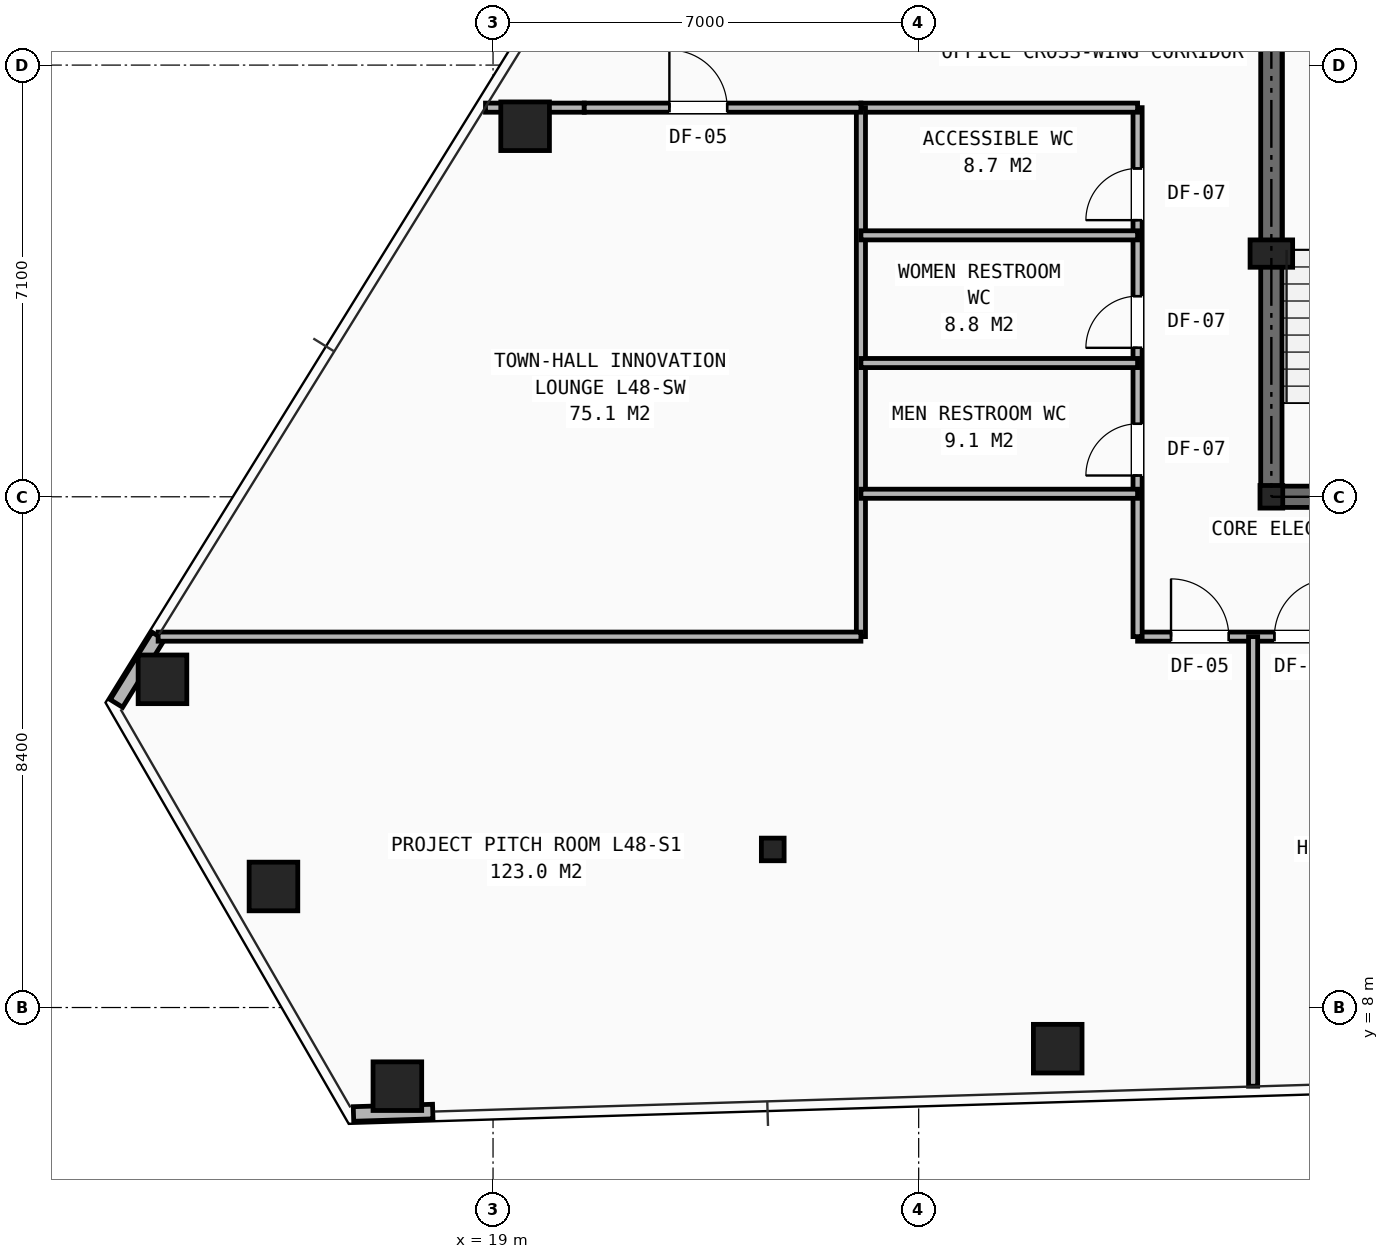
"""IFC4 building model, lengths in metres.
Left out: names, types, materials, properties, quantities, classifications, styles, units other than length and angle.
Written with IfcOpenShell. Run it as: python <this file> out.ifc"""

import sys

from ifc_helpers import new_model, si_unit, direction, frame, frame_2d, origin, origin_2d, place, context, subcontext, project, spatial, rectangle, hollow_rectangle, i_section, extrude, element, fill, save


model = new_model("IFC4")
c1 = context("Model", 3, precision=1e-05, world=origin(), true_north=direction((0.0, 1.0)))
c2 = subcontext(c1, "Body", "Model", "MODEL_VIEW")
j1 = project(units=[si_unit("LENGTHUNIT", "METRE"), si_unit("PLANEANGLEUNIT", "RADIAN")], contexts=[c1])
p1 = place(None, origin())
s1 = spatial("IfcSite", under=j1, at=p1, CompositionType="ELEMENT")
p2 = place(p1, origin())
s2 = spatial("IfcBuilding", under=s1, at=p2, CompositionType="ELEMENT")
p3 = place(p2, frame((0.0, 0.0, 168.9)))
s3 = spatial("IfcBuildingStorey", under=s2, at=p3, CompositionType="ELEMENT", Elevation=168.9)
for number, where, z_axis, x_axis in (
    (1, (31.8, 16.4, 0.0), (0.0, 0.0, 1.0), (1.0, 0.0, 0.0)),
    (2, (23.6, 10.6, 0.0), (0.0, 0.0, 1.0), (1.0, 0.0, 0.0)),
):
    element("IfcColumn", number, at=place(p3, frame(where, z_axis=z_axis, x_axis=x_axis)), inside=s3, PredefinedType="COLUMN", context=c2, shape_type="SweptSolid", body=[
        extrude(i_section(OverallWidth=0.374, OverallDepth=0.372, WebThickness=0.016, FlangeThickness=0.026, at=origin_2d()), origin(), (0.0, 0.0, 1.0), 3.45),
    ])
p4 = place(p3, frame((31.8, 20.4, 0.0), z_axis=(0.0, 0.0, 1.0), x_axis=(1.0, 0.0, 0.0)))
e3 = element("IfcColumn", 3, at=p4, inside=s3, PredefinedType="PILASTER", context=c2, shape_type="SweptSolid", body=[
    extrude(rectangle(XDim=0.7, YDim=0.45, at=origin_2d()), origin(), (0.0, 0.0, 1.0), 3.45),
])
for number, where, z_axis, x_axis in (
    (4, (19.527, 22.494, 0.0), (0.0, 0.0, 1.0), (1.0, 0.0, 0.0)),
    (5, (13.564, 13.398, 0.0), (0.0, 0.0, 1.0), (1.0, 0.0, 0.0)),
    (6, (15.389, 9.991, 0.0), (0.0, 0.0, 1.0), (1.0, 0.0, 0.0)),
    (7, (17.427, 6.707, 0.0), (0.0, 0.0, 1.0), (1.0, 0.0, 0.0)),
    (8, (28.287, 7.323, 0.0), (0.0, 0.0, 1.0), (1.0, 0.0, 0.0)),
):
    element("IfcColumn", number, at=place(p3, frame(where, z_axis=z_axis, x_axis=x_axis)), inside=s3, PredefinedType="COLUMN", context=c2, shape_type="SweptSolid", body=[
        extrude(hollow_rectangle(XDim=0.8, YDim=0.8, WallThickness=0.055, at=origin_2d()), origin(), (0.0, 0.0, 1.0), 3.45),
    ])
p5 = place(p3, frame((13.493, 14.111, 0.0), z_axis=(0.0, 0.0, 1.0), x_axis=(-0.526225760999, -0.850344899709, 0.0)))
e9 = element("IfcWall", 9, at=p5, inside=s3, PredefinedType="SHEAR", context=c2, shape_type="SweptSolid", body=[
    extrude(rectangle(XDim=1.305, YDim=0.24, at=frame_2d((0.652, 0.0))), origin(), (0.0, 0.0, 1.0), 2.583),
])
p6 = place(p3, frame((16.705, 6.249, 0.0), z_axis=(0.0, 0.0, 1.0), x_axis=(0.999534631681, 0.030504427067, 0.0)))
e10 = element("IfcWall", 10, at=p6, inside=s3, PredefinedType="SHEAR", context=c2, shape_type="SweptSolid", body=[
    extrude(rectangle(XDim=1.304, YDim=0.24, at=frame_2d((0.652, 0.0))), origin(), (0.0, 0.0, 1.0), 2.583),
])
p7 = place(p3, frame((31.8, 16.4, 0.0), z_axis=(0.0, 0.0, 1.0), x_axis=(1.0, 0.0, 0.0)))
e11 = element("IfcWall", 11, at=p7, inside=s3, PredefinedType="SHEAR", context=c2, shape_type="SweptSolid", body=[
    extrude(rectangle(XDim=16.4, YDim=0.35, at=frame_2d((8.2, 0.0))), origin(), (0.0, 0.0, 1.0), 3.21),
])
p8 = place(p7, frame((4.2, 0.0, 0.0)))
e12 = element("IfcOpeningElement", 12, at=p8, cuts=e11, PredefinedType="OPENING", context=c2, shape_type="SweptSolid", body=[
    extrude(rectangle(XDim=0.95, YDim=2.1, at=frame_2d((0.475, 1.05))), frame((0.0, 0.185, 0.0), z_axis=(0.0, -1.0, 0.0), x_axis=(1.0, 0.0, 0.0)), (0.0, 0.0, 1.0), 0.37),
])
p9 = place(p7, frame((10.6, 0.0, 0.0)))
e13 = element("IfcOpeningElement", 13, at=p9, cuts=e11, PredefinedType="OPENING", context=c2, shape_type="SweptSolid", body=[
    extrude(rectangle(XDim=0.95, YDim=2.1, at=frame_2d((0.475, 1.05))), frame((0.0, 0.185, 0.0), z_axis=(0.0, -1.0, 0.0), x_axis=(1.0, 0.0, 0.0)), (0.0, 0.0, 1.0), 0.37),
])
p10 = place(p3, frame((31.8, 16.4, 0.0), z_axis=(0.0, 0.0, 1.0), x_axis=(0.0, 1.0, 0.0)))
e14 = element("IfcWall", 14, at=p10, inside=s3, PredefinedType="SHEAR", context=c2, shape_type="SweptSolid", body=[
    extrude(rectangle(XDim=14.8, YDim=0.35, at=frame_2d((7.4, 0.0))), origin(), (0.0, 0.0, 1.0), 3.21),
])
p11 = place(p10, frame((11.0, 0.0, 0.0)))
e15 = element("IfcOpeningElement", 15, at=p11, cuts=e14, PredefinedType="OPENING", context=c2, shape_type="SweptSolid", body=[
    extrude(rectangle(XDim=1.1, YDim=2.15, at=frame_2d((0.55, 1.075))), frame((0.0, 0.185, 0.0), z_axis=(0.0, -1.0, 0.0), x_axis=(1.0, 0.0, 0.0)), (0.0, 0.0, 1.0), 0.37),
])
p12 = place(p3, frame((29.6, 14.1, 0.0), z_axis=(0.0, 0.0, 1.0), x_axis=(1.0, 0.0, 0.0)))
e16 = element("IfcWall", 16, at=p12, inside=s3, PredefinedType="PARTITIONING", context=c2, shape_type="SweptSolid", body=[
    extrude(rectangle(XDim=18.6, YDim=0.15, at=frame_2d((9.3, 0.0))), origin(), (0.0, 0.0, 1.0), 2.225),
])
p13 = place(p12, frame((0.55, 0.0, 0.0)))
e17 = element("IfcOpeningElement", 17, at=p13, cuts=e16, PredefinedType="OPENING", context=c2, shape_type="SweptSolid", body=[
    extrude(rectangle(XDim=0.95, YDim=2.1, at=frame_2d((0.475, 1.05))), frame((0.0, 0.085, 0.0), z_axis=(0.0, -1.0, 0.0), x_axis=(1.0, 0.0, 0.0)), (0.0, 0.0, 1.0), 0.17),
])
p14 = place(p12, frame((2.25, 0.0, 0.0)))
e18 = element("IfcOpeningElement", 18, at=p14, cuts=e16, PredefinedType="OPENING", context=c2, shape_type="SweptSolid", body=[
    extrude(rectangle(XDim=0.95, YDim=2.1, at=frame_2d((0.475, 1.05))), frame((0.0, 0.085, 0.0), z_axis=(0.0, -1.0, 0.0), x_axis=(1.0, 0.0, 0.0)), (0.0, 0.0, 1.0), 0.17),
])
p15 = place(p12, frame((6.55, 0.0, 0.0)))
e19 = element("IfcOpeningElement", 19, at=p15, cuts=e16, PredefinedType="OPENING", context=c2, shape_type="SweptSolid", body=[
    extrude(rectangle(XDim=0.95, YDim=2.1, at=frame_2d((0.475, 1.05))), frame((0.0, 0.085, 0.0), z_axis=(0.0, -1.0, 0.0), x_axis=(1.0, 0.0, 0.0)), (0.0, 0.0, 1.0), 0.17),
])
p16 = place(p12, frame((10.75, 0.0, 0.0)))
e20 = element("IfcOpeningElement", 20, at=p16, cuts=e16, PredefinedType="OPENING", context=c2, shape_type="SweptSolid", body=[
    extrude(rectangle(XDim=0.95, YDim=2.1, at=frame_2d((0.475, 1.05))), frame((0.0, 0.085, 0.0), z_axis=(0.0, -1.0, 0.0), x_axis=(1.0, 0.0, 0.0)), (0.0, 0.0, 1.0), 0.17),
])
p17 = place(p12, frame((14.95, 0.0, 0.0)))
e21 = element("IfcOpeningElement", 21, at=p17, cuts=e16, PredefinedType="OPENING", context=c2, shape_type="SweptSolid", body=[
    extrude(rectangle(XDim=0.95, YDim=2.1, at=frame_2d((0.475, 1.05))), frame((0.0, 0.085, 0.0), z_axis=(0.0, -1.0, 0.0), x_axis=(1.0, 0.0, 0.0)), (0.0, 0.0, 1.0), 0.17),
])
p18 = place(p3, frame((29.6, 14.1, 0.0), z_axis=(0.0, 0.0, 1.0), x_axis=(0.0, 1.0, 0.0)))
e22 = element("IfcWall", 22, at=p18, inside=s3, PredefinedType="PARTITIONING", context=c2, shape_type="SweptSolid", body=[
    extrude(rectangle(XDim=8.7, YDim=0.15, at=frame_2d((4.35, 0.0))), origin(), (0.0, 0.0, 1.0), 3.21),
])
p19 = place(p18, frame((2.65, 0.0, 0.0)))
e23 = element("IfcOpeningElement", 23, at=p19, cuts=e22, PredefinedType="OPENING", context=c2, shape_type="SweptSolid", body=[
    extrude(rectangle(XDim=0.85, YDim=2.05, at=frame_2d((0.425, 1.025))), frame((0.0, 0.085, 0.0), z_axis=(0.0, -1.0, 0.0), x_axis=(1.0, 0.0, 0.0)), (0.0, 0.0, 1.0), 0.17),
])
p20 = place(p18, frame((4.75, 0.0, 0.0)))
e24 = element("IfcOpeningElement", 24, at=p20, cuts=e22, PredefinedType="OPENING", context=c2, shape_type="SweptSolid", body=[
    extrude(rectangle(XDim=0.85, YDim=2.05, at=frame_2d((0.425, 1.025))), frame((0.0, 0.085, 0.0), z_axis=(0.0, -1.0, 0.0), x_axis=(1.0, 0.0, 0.0)), (0.0, 0.0, 1.0), 0.17),
])
p21 = place(p18, frame((6.85, 0.0, 0.0)))
e25 = element("IfcOpeningElement", 25, at=p21, cuts=e22, PredefinedType="OPENING", context=c2, shape_type="SweptSolid", body=[
    extrude(rectangle(XDim=0.85, YDim=2.05, at=frame_2d((0.425, 1.025))), frame((0.0, 0.085, 0.0), z_axis=(0.0, -1.0, 0.0), x_axis=(1.0, 0.0, 0.0)), (0.0, 0.0, 1.0), 0.17),
])
p22 = place(p3, frame((18.876, 22.8, 0.0), z_axis=(0.0, 0.0, 1.0), x_axis=(1.0, 0.0, 0.0)))
e26 = element("IfcWall", 26, at=p22, inside=s3, PredefinedType="PARTITIONING", context=c2, shape_type="SweptSolid", body=[
    extrude(rectangle(XDim=1.624, YDim=0.15, at=frame_2d((0.812, 0.0))), origin(), (0.0, 0.0, 1.0), 2.589),
])
p23 = place(p3, frame((25.05, 22.8, 0.0), z_axis=(0.0, 0.0, 1.0), x_axis=(1.0, 0.0, 0.0)))
e27 = element("IfcWall", 27, at=p23, inside=s3, PredefinedType="PARTITIONING", context=c2, shape_type="SweptSolid", body=[
    extrude(rectangle(XDim=4.55, YDim=0.15, at=frame_2d((2.275, 0.0))), origin(), (0.0, 0.0, 1.0), 3.21),
])
p24 = place(p3, frame((25.05, 14.1, 0.0), z_axis=(0.0, 0.0, 1.0), x_axis=(0.0, 1.0, 0.0)))
e28 = element("IfcWall", 28, at=p24, inside=s3, PredefinedType="PARTITIONING", context=c2, shape_type="SweptSolid", body=[
    extrude(rectangle(XDim=8.7, YDim=0.15, at=frame_2d((4.35, 0.0))), origin(), (0.0, 0.0, 1.0), 3.21),
])
for number, where, z_axis, x_axis in (
    (29, (25.05, 16.45, 0.0), (0.0, 0.0, 1.0), (1.0, 0.0, 0.0)),
    (30, (25.05, 18.6, 0.0), (0.0, 0.0, 1.0), (1.0, 0.0, 0.0)),
    (31, (25.05, 20.7, 0.0), (0.0, 0.0, 1.0), (1.0, 0.0, 0.0)),
):
    element("IfcWall", number, at=place(p3, frame(where, z_axis=z_axis, x_axis=x_axis)), inside=s3, PredefinedType="PARTITIONING", context=c2, shape_type="SweptSolid", body=[
        extrude(rectangle(XDim=4.55, YDim=0.15, at=frame_2d((2.275, 0.0))), origin(), (0.0, 0.0, 1.0), 3.21),
    ])
p25 = place(p3, frame((31.5, 6.706, 0.0), z_axis=(0.0, 0.0, 1.0), x_axis=(0.0, 1.0, 0.0)))
e32 = element("IfcWall", 32, at=p25, inside=s3, PredefinedType="PARTITIONING", context=c2, shape_type="SweptSolid", body=[
    extrude(rectangle(XDim=7.394, YDim=0.15, at=frame_2d((3.697, 0.0))), origin(), (0.0, 0.0, 1.0), 2.589),
])
p26 = place(p3, frame((13.492, 14.1, 0.0), z_axis=(0.0, 0.0, 1.0), x_axis=(1.0, 0.0, 0.0)))
e33 = element("IfcWall", 33, at=p26, inside=s3, PredefinedType="PARTITIONING", context=c2, shape_type="SweptSolid", body=[
    extrude(rectangle(XDim=11.558, YDim=0.15, at=frame_2d((5.779, 0.0))), origin(), (0.0, 0.0, 1.0), 2.589),
])
p27 = place(p3, frame((20.5, 22.8, 0.0), z_axis=(0.0, 0.0, 1.0), x_axis=(1.0, 0.0, 0.0)))
e34 = element("IfcWall", 34, at=p27, inside=s3, PredefinedType="PARTITIONING", context=c2, shape_type="SweptSolid", body=[
    extrude(rectangle(XDim=4.55, YDim=0.15, at=frame_2d((2.275, 0.0))), origin(), (0.0, 0.0, 1.0), 3.21),
])
p28 = place(p27, frame((1.4, 0.0, 0.0)))
e35 = element("IfcOpeningElement", 35, at=p28, cuts=e34, PredefinedType="OPENING", context=c2, shape_type="SweptSolid", body=[
    extrude(rectangle(XDim=0.95, YDim=2.1, at=frame_2d((0.475, 1.05))), frame((0.0, 0.085, 0.0), z_axis=(0.0, -1.0, 0.0), x_axis=(1.0, 0.0, 0.0)), (0.0, 0.0, 1.0), 0.17),
])
p29 = place(p19, origin())
e36 = element("IfcDoor", 36, at=p29, inside=s3, OperationType="SINGLE_SWING_LEFT", PredefinedType="DOOR", context=c2, shape_type="SweptSolid", body=[
    extrude(rectangle(XDim=0.85, YDim=2.05, at=frame_2d((0.425, 1.025))), frame((0.0, 0.025, 0.0), z_axis=(0.0, -1.0, 0.0), x_axis=(1.0, 0.0, 0.0)), (0.0, 0.0, 1.0), 0.05),
])
fill(e23, e36)
p30 = place(p20, origin())
e37 = element("IfcDoor", 37, at=p30, inside=s3, OperationType="SINGLE_SWING_LEFT", PredefinedType="DOOR", context=c2, shape_type="SweptSolid", body=[
    extrude(rectangle(XDim=0.85, YDim=2.05, at=frame_2d((0.425, 1.025))), frame((0.0, 0.025, 0.0), z_axis=(0.0, -1.0, 0.0), x_axis=(1.0, 0.0, 0.0)), (0.0, 0.0, 1.0), 0.05),
])
fill(e24, e37)
p31 = place(p21, origin())
e38 = element("IfcDoor", 38, at=p31, inside=s3, OperationType="SINGLE_SWING_LEFT", PredefinedType="DOOR", context=c2, shape_type="SweptSolid", body=[
    extrude(rectangle(XDim=0.85, YDim=2.05, at=frame_2d((0.425, 1.025))), frame((0.0, 0.025, 0.0), z_axis=(0.0, -1.0, 0.0), x_axis=(1.0, 0.0, 0.0)), (0.0, 0.0, 1.0), 0.05),
])
fill(e25, e38)
p32 = place(p13, origin())
e39 = element("IfcDoor", 39, at=p32, inside=s3, OperationType="SINGLE_SWING_LEFT", PredefinedType="DOOR", context=c2, shape_type="SweptSolid", body=[
    extrude(rectangle(XDim=0.95, YDim=2.1, at=frame_2d((0.475, 1.05))), frame((0.0, 0.025, 0.0), z_axis=(0.0, -1.0, 0.0), x_axis=(1.0, 0.0, 0.0)), (0.0, 0.0, 1.0), 0.05),
])
fill(e17, e39)
p33 = place(p14, origin())
e40 = element("IfcDoor", 40, at=p33, inside=s3, OperationType="SINGLE_SWING_RIGHT", PredefinedType="DOOR", context=c2, shape_type="SweptSolid", body=[
    extrude(rectangle(XDim=0.95, YDim=2.1, at=frame_2d((0.475, 1.05))), frame((0.0, 0.025, 0.0), z_axis=(0.0, -1.0, 0.0), x_axis=(1.0, 0.0, 0.0)), (0.0, 0.0, 1.0), 0.05),
])
fill(e18, e40)
p34 = place(p28, origin())
e41 = element("IfcDoor", 41, at=p34, inside=s3, OperationType="SINGLE_SWING_LEFT", PredefinedType="DOOR", context=c2, shape_type="SweptSolid", body=[
    extrude(rectangle(XDim=0.95, YDim=2.1, at=frame_2d((0.475, 1.05))), frame((0.0, 0.025, 0.0), z_axis=(0.0, -1.0, 0.0), x_axis=(1.0, 0.0, 0.0)), (0.0, 0.0, 1.0), 0.05),
])
fill(e35, e41)
save(model, sys.argv[1])
